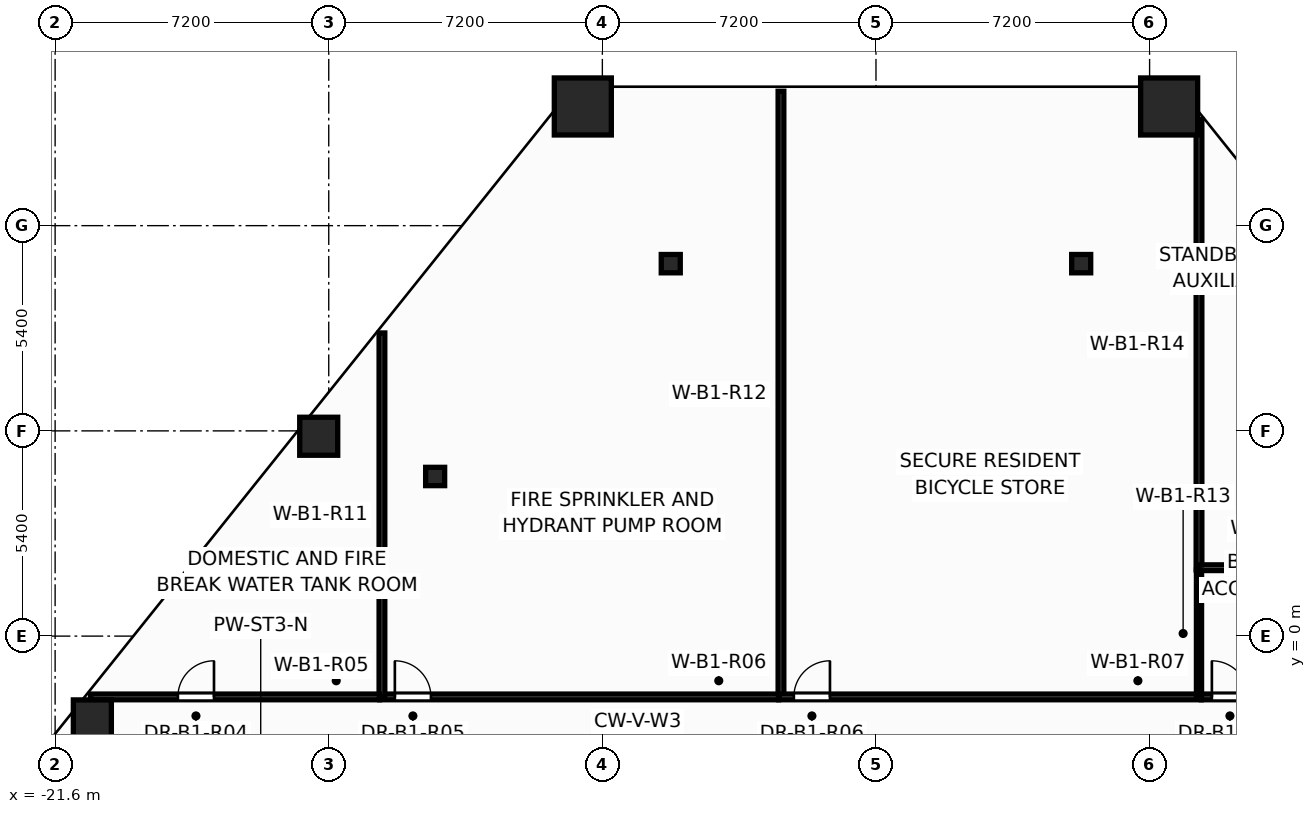
"""IFC4 building model, lengths in metres.
Left out: names, types, materials, properties, quantities, classifications, styles, units other than length and angle.
Written with IfcOpenShell. Run it as: python <this file> out.ifc"""

import sys

from ifc_helpers import new_model, si_unit, direction, frame, frame_2d, origin, origin_2d, place, context, subcontext, project, spatial, rectangle, hollow_rectangle, hollow_circle, i_section, extrude, element, fill, save


model = new_model("IFC4")
c1 = context("Model", 3, precision=1e-05, world=origin(), true_north=direction((0.0, 1.0)))
c2 = subcontext(c1, "Body", "Model", "MODEL_VIEW")
j1 = project(units=[si_unit("LENGTHUNIT", "METRE"), si_unit("PLANEANGLEUNIT", "RADIAN")], contexts=[c1])
p1 = place(None, origin())
s1 = spatial("IfcSite", under=j1, at=p1, CompositionType="ELEMENT")
p2 = place(p1, origin())
s2 = spatial("IfcBuilding", under=s1, at=p2, CompositionType="ELEMENT")
p3 = place(p2, frame((0.0, 0.0, -4.8)))
s3 = spatial("IfcBuildingStorey", under=s2, at=p3, CompositionType="ELEMENT", Elevation=-4.8)
for number, where, z_axis, x_axis in (
    (1, (7.714, 13.936, 0.0), (0.0, 0.0, 1.0), (1.0, 0.0, 0.0)),
    (2, (-7.714, 13.936, 0.0), (0.0, 0.0, 1.0), (1.0, 0.0, 0.0)),
):
    element("IfcColumn", number, at=place(p3, frame(where, z_axis=z_axis, x_axis=x_axis)), inside=s3, PredefinedType="COLUMN", context=c2, shape_type="SweptSolid", body=[
        extrude(hollow_rectangle(XDim=1.5, YDim=1.5, WallThickness=0.075, at=origin_2d()), origin(), (0.0, 0.0, 1.0), 4.8),
    ])
for number, where, z_axis, x_axis in (
    (3, (-14.664, 5.259, 0.0), (0.0, 0.0, 1.0), (1.0, 0.0, 0.0)),
    (4, (-20.62, -2.179, 0.0), (0.0, 0.0, 1.0), (1.0, 0.0, 0.0)),
):
    element("IfcColumn", number, at=place(p3, frame(where, z_axis=z_axis, x_axis=x_axis)), inside=s3, PredefinedType="COLUMN", context=c2, shape_type="SweptSolid", body=[
        extrude(hollow_circle(Radius=0.5, WallThickness=0.045, at=origin_2d()), origin(), (0.0, 0.0, 1.0), 4.8),
    ])
for number, where, z_axis, x_axis in (
    (5, (-11.6, 4.2, 0.0), (0.0, 0.0, 1.0), (1.0, 0.0, 0.0)),
    (6, (-5.4, 9.8, 0.0), (0.0, 0.0, 1.0), (1.0, 0.0, 0.0)),
    (7, (5.4, 9.8, 0.0), (0.0, 0.0, 1.0), (1.0, 0.0, 0.0)),
):
    element("IfcColumn", number, at=place(p3, frame(where, z_axis=z_axis, x_axis=x_axis)), inside=s3, PredefinedType="COLUMN", context=c2, shape_type="SweptSolid", body=[
        extrude(i_section(OverallWidth=0.5, OverallDepth=0.482, WebThickness=0.04, FlangeThickness=0.045, at=origin_2d()), origin(), (0.0, 0.0, 1.0), 4.8),
    ])
p4 = place(p3, frame((-2.5, -1.6, 0.0), z_axis=(0.0, 0.0, 1.0), x_axis=(0.0, 1.0, 0.0)))
e8 = element("IfcWall", 8, at=p4, inside=s3, PredefinedType="PARTITIONING", context=c2, shape_type="SweptSolid", body=[
    extrude(rectangle(XDim=15.936, YDim=0.15, at=frame_2d((7.968, 0.0))), origin(), (0.0, 0.0, 1.0), 3.255),
])
p5 = place(p3, frame((8.5, 1.74, 0.0), z_axis=(0.0, 0.0, 1.0), x_axis=(0.0, 1.0, 0.0)))
e9 = element("IfcWall", 9, at=p5, inside=s3, PredefinedType="PARTITIONING", context=c2, shape_type="SweptSolid", body=[
    extrude(rectangle(XDim=11.855, YDim=0.15, at=frame_2d((5.927, 0.0))), origin(), (0.0, 0.0, 1.0), 3.255),
])
p6 = place(p3, frame((-2.56, -1.6, 0.0), z_axis=(0.0, 0.0, 1.0), x_axis=(1.0, 0.0, 0.0)))
e10 = element("IfcWall", 10, at=p6, inside=s3, PredefinedType="PARTITIONING", context=c2, shape_type="SweptSolid", body=[
    extrude(rectangle(XDim=11.12, YDim=0.15, at=frame_2d((5.56, 0.0))), origin(), (0.0, 0.0, 1.0), 4.48),
])
p7 = place(p6, frame((0.399, 0.0, 0.0)))
e11 = element("IfcOpeningElement", 11, at=p7, cuts=e10, PredefinedType="OPENING", context=c2, shape_type="SweptSolid", body=[
    extrude(rectangle(XDim=0.956, YDim=2.104, at=frame_2d((0.475, 1.052))), frame((0.0, 0.085, 0.0), z_axis=(0.0, -1.0, 0.0), x_axis=(1.0, 0.0, 0.0)), (0.0, 0.0, 1.0), 0.17),
])
p8 = place(p3, frame((-13.06, -1.6, 0.0), z_axis=(0.0, 0.0, 1.0), x_axis=(1.0, 0.0, 0.0)))
e12 = element("IfcWall", 12, at=p8, inside=s3, PredefinedType="PARTITIONING", context=c2, shape_type="SweptSolid", body=[
    extrude(rectangle(XDim=10.498, YDim=0.15, at=frame_2d((5.249, 0.0))), origin(), (0.0, 0.0, 1.0), 4.48),
])
p9 = place(p8, frame((0.4, 0.0, 0.0)))
e13 = element("IfcOpeningElement", 13, at=p9, cuts=e12, PredefinedType="OPENING", context=c2, shape_type="SweptSolid", body=[
    extrude(rectangle(XDim=0.956, YDim=2.104, at=frame_2d((0.475, 1.052))), frame((0.0, 0.085, 0.0), z_axis=(0.0, -1.0, 0.0), x_axis=(1.0, 0.0, 0.0)), (0.0, 0.0, 1.0), 0.17),
])
p10 = place(p3, frame((-13.0, -1.6, 0.0), z_axis=(0.0, 0.0, 1.0), x_axis=(0.0, 1.0, 0.0)))
e14 = element("IfcWall", 14, at=p10, inside=s3, PredefinedType="PARTITIONING", context=c2, shape_type="SweptSolid", body=[
    extrude(rectangle(XDim=9.576, YDim=0.15, at=frame_2d((4.788, 0.0))), origin(), (0.0, 0.0, 1.0), 3.547),
])
p11 = place(p3, frame((-20.669, -1.6, 0.0), z_axis=(0.0, 0.0, 1.0), x_axis=(1.0, 0.0, 0.0)))
e15 = element("IfcWall", 15, at=p11, inside=s3, PredefinedType="PARTITIONING", context=c2, shape_type="SweptSolid", body=[
    extrude(rectangle(XDim=7.607, YDim=0.15, at=frame_2d((3.804, 0.0))), origin(), (0.0, 0.0, 1.0), 3.547),
])
p12 = place(p11, frame((2.3, 0.0, 0.0)))
e16 = element("IfcOpeningElement", 16, at=p12, cuts=e15, PredefinedType="OPENING", context=c2, shape_type="SweptSolid", body=[
    extrude(rectangle(XDim=0.956, YDim=2.104, at=frame_2d((0.475, 1.052))), frame((0.0, 0.085, 0.0), z_axis=(0.0, -1.0, 0.0), x_axis=(1.0, 0.0, 0.0)), (0.0, 0.0, 1.0), 0.17),
])
p13 = place(p3, frame((8.562, -1.6, 0.0), z_axis=(0.0, 0.0, 1.0), x_axis=(1.0, 0.0, 0.0)))
e17 = element("IfcWall", 17, at=p13, inside=s3, PredefinedType="PARTITIONING", context=c2, shape_type="SweptSolid", body=[
    extrude(rectangle(XDim=3.576, YDim=0.15, at=frame_2d((1.788, 0.0))), origin(), (0.0, 0.0, 1.0), 4.48),
])
p14 = place(p13, frame((0.277, 0.0, 0.0)))
e18 = element("IfcOpeningElement", 18, at=p14, cuts=e17, PredefinedType="OPENING", context=c2, shape_type="SweptSolid", body=[
    extrude(rectangle(XDim=0.956, YDim=2.104, at=frame_2d((0.475, 1.052))), frame((0.0, 0.085, 0.0), z_axis=(0.0, -1.0, 0.0), x_axis=(1.0, 0.0, 0.0)), (0.0, 0.0, 1.0), 0.17),
])
p15 = place(p3, frame((8.5, 1.8, 0.0), z_axis=(0.0, 0.0, 1.0), x_axis=(1.0, 0.0, 0.0)))
e19 = element("IfcWall", 19, at=p15, inside=s3, PredefinedType="PARTITIONING", context=c2, shape_type="SweptSolid", body=[
    extrude(rectangle(XDim=3.7, YDim=0.15, at=frame_2d((1.85, 0.0))), origin(), (0.0, 0.0, 1.0), 4.48),
])
p16 = place(p3, frame((8.5, -1.6, 0.0), z_axis=(0.0, 0.0, 1.0), x_axis=(0.0, 1.0, 0.0)))
e20 = element("IfcWall", 20, at=p16, inside=s3, PredefinedType="PARTITIONING", context=c2, shape_type="SweptSolid", body=[
    extrude(rectangle(XDim=3.338, YDim=0.135, at=frame_2d((1.669, 0.0))), origin(), (0.0, 0.0, 1.0), 4.48),
])
p17 = place(p12, origin())
e21 = element("IfcDoor", 21, at=p17, inside=s3, OperationType="SINGLE_SWING_RIGHT", PredefinedType="DOOR", context=c2, shape_type="SweptSolid", body=[
    extrude(rectangle(XDim=0.95, YDim=2.1, at=frame_2d((0.475, 1.05))), frame((0.0, 0.025, 0.0), z_axis=(0.0, -1.0, 0.0), x_axis=(1.0, 0.0, 0.0)), (0.0, 0.0, 1.0), 0.05),
])
fill(e16, e21)
p18 = place(p9, origin())
e22 = element("IfcDoor", 22, at=p18, inside=s3, OperationType="SINGLE_SWING_LEFT", PredefinedType="DOOR", context=c2, shape_type="SweptSolid", body=[
    extrude(rectangle(XDim=0.95, YDim=2.1, at=frame_2d((0.475, 1.05))), frame((0.0, 0.025, 0.0), z_axis=(0.0, -1.0, 0.0), x_axis=(1.0, 0.0, 0.0)), (0.0, 0.0, 1.0), 0.05),
])
fill(e13, e22)
p19 = place(p7, origin())
e23 = element("IfcDoor", 23, at=p19, inside=s3, OperationType="SINGLE_SWING_RIGHT", PredefinedType="DOOR", context=c2, shape_type="SweptSolid", body=[
    extrude(rectangle(XDim=0.95, YDim=2.1, at=frame_2d((0.475, 1.05))), frame((0.0, 0.025, 0.0), z_axis=(0.0, -1.0, 0.0), x_axis=(1.0, 0.0, 0.0)), (0.0, 0.0, 1.0), 0.05),
])
fill(e11, e23)
p20 = place(p14, origin())
e24 = element("IfcDoor", 24, at=p20, inside=s3, OperationType="SINGLE_SWING_LEFT", PredefinedType="DOOR", context=c2, shape_type="SweptSolid", body=[
    extrude(rectangle(XDim=0.95, YDim=2.1, at=frame_2d((0.475, 1.05))), frame((0.0, 0.025, 0.0), z_axis=(0.0, -1.0, 0.0), x_axis=(1.0, 0.0, 0.0)), (0.0, 0.0, 1.0), 0.05),
])
fill(e18, e24)
save(model, sys.argv[1])
